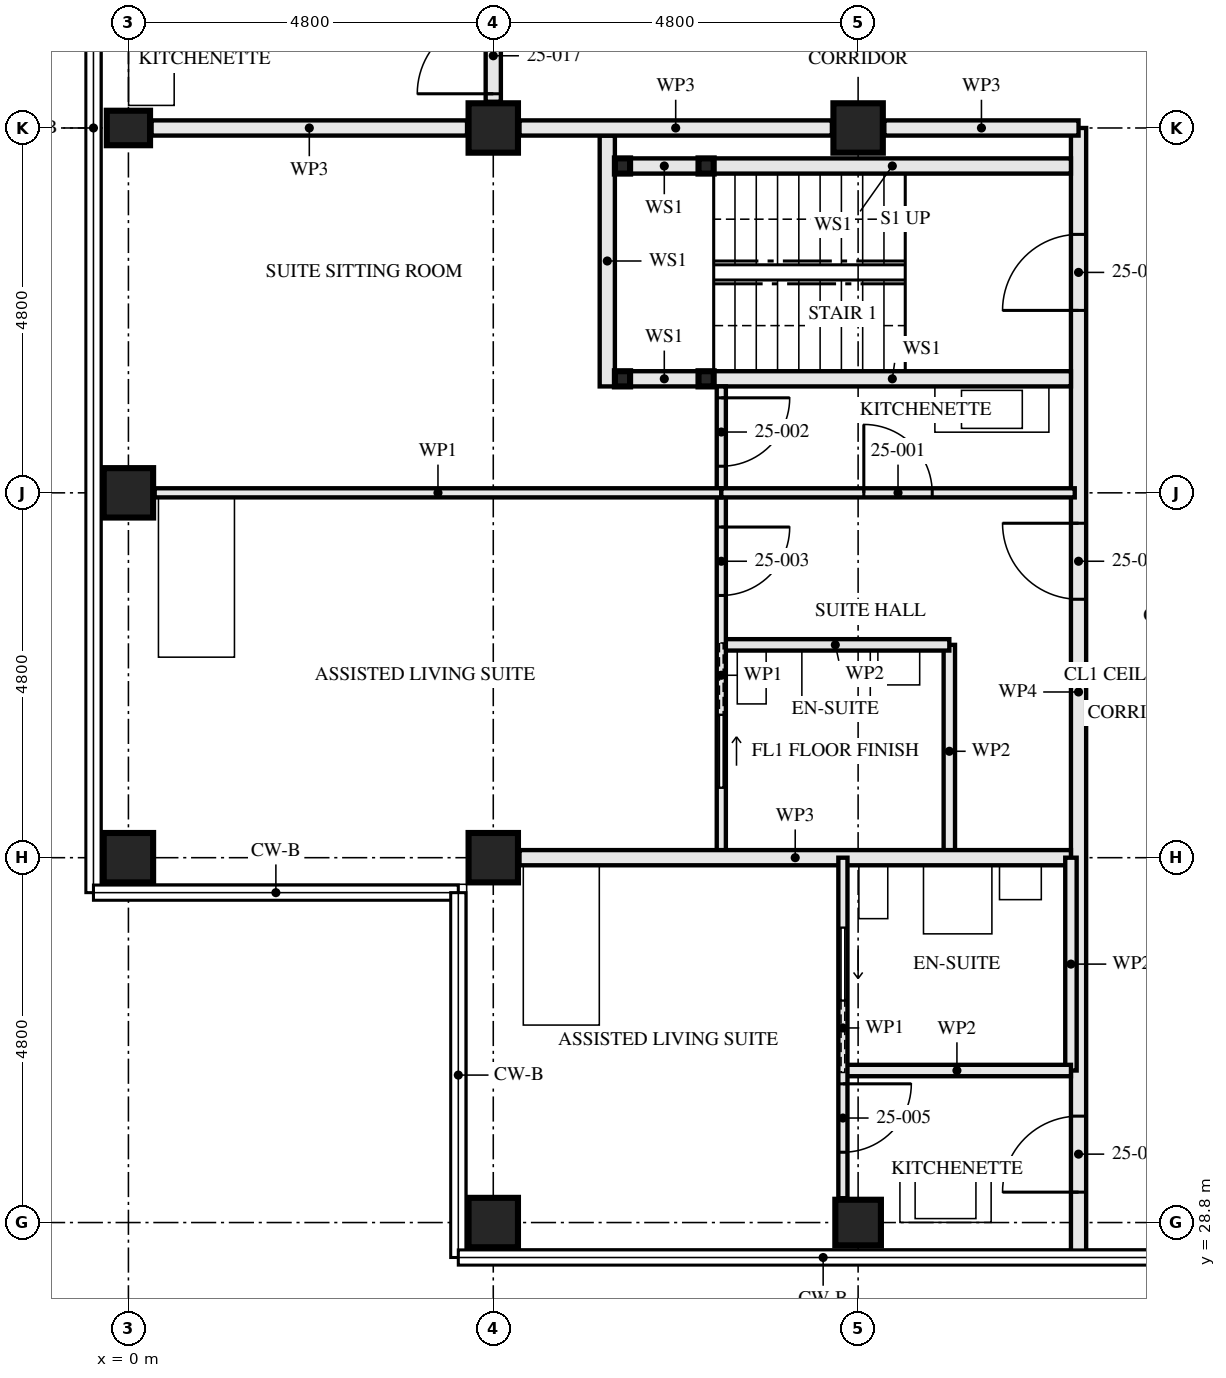
"""IFC4 building model, lengths in metres.
Left out: names, types, materials, properties, quantities, classifications, styles, units other than length and angle.
Written with IfcOpenShell. Run it as: python <this file> out.ifc"""

import sys

from ifc_helpers import new_model, si_unit, direction, frame, frame_2d, origin, origin_2d, place, context, subcontext, project, spatial, rectangle, hollow_rectangle, i_section, extrude, element, fill, save


model = new_model("IFC4")
c1 = context("Model", 3, precision=1e-05, world=origin(), true_north=direction((0.0, 1.0)))
c2 = subcontext(c1, "Body", "Model", "MODEL_VIEW")
j1 = project(units=[si_unit("LENGTHUNIT", "METRE"), si_unit("PLANEANGLEUNIT", "RADIAN")], contexts=[c1])
p1 = place(None, origin())
s1 = spatial("IfcSite", under=j1, at=p1, CompositionType="ELEMENT")
p2 = place(p1, origin())
s2 = spatial("IfcBuilding", under=s1, at=p2, CompositionType="ELEMENT")
p3 = place(p2, frame((0.0, 0.0, 94.5)))
s3 = spatial("IfcBuildingStorey", under=s2, at=p3, CompositionType="ELEMENT", Elevation=94.5)
for number, where, z_axis, x_axis in (
    (1, (0.0, 33.6, 0.0), (0.0, 0.0, 1.0), (0.0, 1.0, 0.0)),
    (2, (0.0, 38.4, 0.0), (0.0, 0.0, 1.0), (1.0, 0.0, 0.0)),
):
    element("IfcColumn", number, at=place(p3, frame(where, z_axis=z_axis, x_axis=x_axis)), inside=s3, PredefinedType="COLUMN", context=c2, shape_type="SweptSolid", body=[
        extrude(hollow_rectangle(XDim=0.65, YDim=0.65, WallThickness=0.08, at=origin_2d()), origin(), (0.0, 0.0, 1.0), 3.5),
    ])
p4 = place(p3, frame((0.0, 43.2, 0.0), z_axis=(0.0, 0.0, 1.0), x_axis=(0.0, 1.0, 0.0)))
e3 = element("IfcColumn", 3, at=p4, inside=s3, PredefinedType="COLUMN", context=c2, shape_type="SweptSolid", body=[
    extrude(i_section(OverallWidth=0.454, OverallDepth=0.569, WebThickness=0.078, FlangeThickness=0.125, FilletRadius=0.015, at=origin_2d()), origin(), (0.0, 0.0, 1.0), 3.5),
])
for number, where, z_axis, x_axis in (
    (4, (4.8, 28.8, 0.0), (0.0, 0.0, 1.0), (0.0, 1.0, 0.0)),
    (5, (4.8, 33.6, 0.0), (0.0, 0.0, 1.0), (0.0, 1.0, 0.0)),
):
    element("IfcColumn", number, at=place(p3, frame(where, z_axis=z_axis, x_axis=x_axis)), inside=s3, PredefinedType="COLUMN", context=c2, shape_type="SweptSolid", body=[
        extrude(hollow_rectangle(XDim=0.65, YDim=0.65, WallThickness=0.08, at=origin_2d()), origin(), (0.0, 0.0, 1.0), 3.5),
    ])
p5 = place(p3, frame((4.8, 43.2, 0.0), z_axis=(0.0, 0.0, 1.0), x_axis=(0.0, 1.0, 0.0)))
e6 = element("IfcColumn", 6, at=p5, inside=s3, PredefinedType="COLUMN", context=c2, shape_type="SweptSolid", body=[
    extrude(hollow_rectangle(XDim=0.65, YDim=0.65, WallThickness=0.05, at=origin_2d()), origin(), (0.0, 0.0, 1.0), 3.5),
])
p6 = place(p3, frame((9.6, 28.8, 0.0), z_axis=(0.0, 0.0, 1.0), x_axis=(0.0, 1.0, 0.0)))
e7 = element("IfcColumn", 7, at=p6, inside=s3, PredefinedType="COLUMN", context=c2, shape_type="SweptSolid", body=[
    extrude(hollow_rectangle(XDim=0.6, YDim=0.6, WallThickness=0.08, at=origin_2d()), origin(), (0.0, 0.0, 1.0), 3.5),
])
p7 = place(p3, frame((9.6, 43.2, 0.0), z_axis=(0.0, 0.0, 1.0), x_axis=(0.0, 1.0, 0.0)))
e8 = element("IfcColumn", 8, at=p7, inside=s3, PredefinedType="COLUMN", context=c2, shape_type="SweptSolid", body=[
    extrude(hollow_rectangle(XDim=0.65, YDim=0.65, WallThickness=0.05, at=origin_2d()), origin(), (0.0, 0.0, 1.0), 3.5),
])
for number, where, z_axis, x_axis in (
    (9, (6.5, 42.7, 0.0), (0.0, 0.0, 1.0), (1.0, 0.0, 0.0)),
    (10, (6.5, 39.9, 0.0), (0.0, 0.0, 1.0), (1.0, 0.0, 0.0)),
    (11, (7.6, 42.7, 0.0), (0.0, 0.0, 1.0), (1.0, 0.0, 0.0)),
    (12, (7.6, 39.9, 0.0), (0.0, 0.0, 1.0), (1.0, 0.0, 0.0)),
):
    element("IfcColumn", number, at=place(p3, frame(where, z_axis=z_axis, x_axis=x_axis)), inside=s3, PredefinedType="COLUMN", context=c2, shape_type="SweptSolid", body=[
        extrude(hollow_rectangle(XDim=0.2, YDim=0.2, WallThickness=0.008, at=origin_2d()), origin(), (0.0, 0.0, 1.0), 3.33),
    ])
p8 = place(p3, frame((6.6, 42.7, 0.0), z_axis=(0.0, 0.0, 1.0), x_axis=(1.0, 0.0, 0.0)))
e13 = element("IfcWall", 13, at=p8, inside=s3, PredefinedType="SOLIDWALL", context=c2, shape_type="SweptSolid", body=[
    extrude(rectangle(XDim=0.9, YDim=0.2, at=frame_2d((0.45, 0.0))), origin(), (0.0, 0.0, 1.0), 2.99),
])
p9 = place(p3, frame((7.7, 42.7, 0.0), z_axis=(0.0, 0.0, 1.0), x_axis=(1.0, 0.0, 0.0)))
e14 = element("IfcWall", 14, at=p9, inside=s3, PredefinedType="SOLIDWALL", context=c2, shape_type="SweptSolid", body=[
    extrude(rectangle(XDim=4.7, YDim=0.2, at=frame_2d((2.35, 0.0))), origin(), (0.0, 0.0, 1.0), 2.99),
])
p10 = place(p3, frame((6.6, 39.9, 0.0), z_axis=(0.0, 0.0, 1.0), x_axis=(1.0, 0.0, 0.0)))
e15 = element("IfcWall", 15, at=p10, inside=s3, PredefinedType="SOLIDWALL", context=c2, shape_type="SweptSolid", body=[
    extrude(rectangle(XDim=0.9, YDim=0.2, at=frame_2d((0.45, 0.0))), origin(), (0.0, 0.0, 1.0), 2.99),
])
p11 = place(p3, frame((7.7, 39.9, 0.0), z_axis=(0.0, 0.0, 1.0), x_axis=(1.0, 0.0, 0.0)))
e16 = element("IfcWall", 16, at=p11, inside=s3, PredefinedType="SOLIDWALL", context=c2, shape_type="SweptSolid", body=[
    extrude(rectangle(XDim=4.7, YDim=0.2, at=frame_2d((2.35, 0.0))), origin(), (0.0, 0.0, 1.0), 2.99),
])
p12 = place(p3, frame((6.3, 43.1, 0.0), z_axis=(0.0, 0.0, 1.0), x_axis=(0.0, -1.0, 0.0)))
e17 = element("IfcWall", 17, at=p12, inside=s3, PredefinedType="SOLIDWALL", context=c2, shape_type="SweptSolid", body=[
    extrude(rectangle(XDim=3.3, YDim=0.2, at=frame_2d((1.65, 0.0))), origin(), (0.0, 0.0, 1.0), 3.33),
])
p13 = place(p3, frame((7.8, 36.4, 0.0), z_axis=(0.0, 0.0, 1.0), x_axis=(1.0, 0.0, 0.0)))
e18 = element("IfcWall", 18, at=p13, inside=s3, PredefinedType="PARTITIONING", context=c2, shape_type="SweptSolid", body=[
    extrude(rectangle(XDim=3.0, YDim=0.15, at=frame_2d((1.5, 0.0))), origin(), (0.0, 0.0, 1.0), 3.33),
])
p14 = place(p3, frame((10.8, 36.4, 0.0), z_axis=(0.0, 0.0, 1.0), x_axis=(0.0, -1.0, 0.0)))
e19 = element("IfcWall", 19, at=p14, inside=s3, PredefinedType="PARTITIONING", context=c2, shape_type="SweptSolid", body=[
    extrude(rectangle(XDim=2.8, YDim=0.15, at=frame_2d((1.4, 0.0))), origin(), (0.0, 0.0, 1.0), 3.33),
])
p15 = place(p3, frame((7.8, 38.4, 0.0), z_axis=(0.0, 0.0, 1.0), x_axis=(1.0, 0.0, 0.0)))
e20 = element("IfcWall", 20, at=p15, inside=s3, PredefinedType="PARTITIONING", context=c2, shape_type="SweptSolid", body=[
    extrude(rectangle(XDim=4.65, YDim=0.12, at=frame_2d((2.325, 0.0))), origin(), (0.0, 0.0, 1.0), 2.55),
])
p16 = place(p15, frame((1.875, 0.0, 0.0)))
e21 = element("IfcOpeningElement", 21, at=p16, cuts=e20, PredefinedType="OPENING", context=c2, shape_type="SweptSolid", body=[
    extrude(rectangle(XDim=0.9, YDim=2.1, at=frame_2d((0.45, 1.05))), frame((0.0, 0.071, 0.0), z_axis=(0.0, -1.0, 0.0), x_axis=(1.0, 0.0, 0.0)), (0.0, 0.0, 1.0), 0.141),
])
p17 = place(p3, frame((7.8, 39.8, 0.0), z_axis=(0.0, 0.0, 1.0), x_axis=(0.0, -1.0, 0.0)))
e22 = element("IfcWall", 22, at=p17, inside=s3, PredefinedType="PARTITIONING", context=c2, shape_type="SweptSolid", body=[
    extrude(rectangle(XDim=1.4, YDim=0.12, at=frame_2d((0.7, 0.0))), origin(), (0.0, 0.0, 1.0), 3.33),
])
p18 = place(p17, frame((0.15, 0.0, 0.0)))
e23 = element("IfcOpeningElement", 23, at=p18, cuts=e22, PredefinedType="OPENING", context=c2, shape_type="SweptSolid", body=[
    extrude(rectangle(XDim=0.9, YDim=2.1, at=frame_2d((0.45, 1.05))), frame((0.0, 0.071, 0.0), z_axis=(0.0, -1.0, 0.0), x_axis=(1.0, 0.0, 0.0)), (0.0, 0.0, 1.0), 0.141),
])
p19 = place(p3, frame((7.8, 38.4, 0.0), z_axis=(0.0, 0.0, 1.0), x_axis=(0.0, -1.0, 0.0)))
e24 = element("IfcWall", 24, at=p19, inside=s3, PredefinedType="PARTITIONING", context=c2, shape_type="SweptSolid", body=[
    extrude(rectangle(XDim=4.8, YDim=0.12, at=frame_2d((2.4, 0.0))), origin(), (0.0, 0.0, 1.0), 3.33),
])
p20 = place(p19, frame((0.45, 0.0, 0.0)))
e25 = element("IfcOpeningElement", 25, at=p20, cuts=e24, PredefinedType="OPENING", context=c2, shape_type="SweptSolid", body=[
    extrude(rectangle(XDim=0.9, YDim=2.1, at=frame_2d((0.45, 1.05))), frame((0.0, 0.071, 0.0), z_axis=(0.0, -1.0, 0.0), x_axis=(1.0, 0.0, 0.0)), (0.0, 0.0, 1.0), 0.141),
])
p21 = place(p19, frame((2.925, 0.0, 0.0)))
e26 = element("IfcOpeningElement", 26, at=p21, cuts=e24, PredefinedType="OPENING", context=c2, shape_type="SweptSolid", body=[
    extrude(rectangle(XDim=0.95, YDim=2.1, at=frame_2d((0.475, 1.05))), frame((0.0, 0.071, 0.0), z_axis=(0.0, -1.0, 0.0), x_axis=(1.0, 0.0, 0.0)), (0.0, 0.0, 1.0), 0.141),
])
p22 = place(p3, frame((0.345, 38.4, 0.0), z_axis=(0.0, 0.0, 1.0), x_axis=(1.0, 0.0, 0.0)))
e27 = element("IfcWall", 27, at=p22, inside=s3, PredefinedType="PARTITIONING", context=c2, shape_type="SweptSolid", body=[
    extrude(rectangle(XDim=7.455, YDim=0.12, at=frame_2d((3.728, 0.0))), origin(), (0.0, 0.0, 1.0), 2.55),
])
p23 = place(p3, frame((5.145, 33.6, 0.0), z_axis=(0.0, 0.0, 1.0), x_axis=(1.0, 0.0, 0.0)))
e28 = element("IfcWall", 28, at=p23, inside=s3, PredefinedType="PARTITIONING", context=c2, shape_type="SweptSolid", body=[
    extrude(rectangle(XDim=7.255, YDim=0.2, at=frame_2d((3.627, 0.0))), origin(), (0.0, 0.0, 1.0), 2.55),
])
p24 = place(p3, frame((9.4, 30.8, 0.0), z_axis=(0.0, 0.0, 1.0), x_axis=(1.0, 0.0, 0.0)))
e29 = element("IfcWall", 29, at=p24, inside=s3, PredefinedType="PARTITIONING", context=c2, shape_type="SweptSolid", body=[
    extrude(rectangle(XDim=3.0, YDim=0.15, at=frame_2d((1.5, 0.0))), origin(), (0.0, 0.0, 1.0), 3.33),
])
p25 = place(p3, frame((12.4, 33.6, 0.0), z_axis=(0.0, 0.0, 1.0), x_axis=(0.0, -1.0, 0.0)))
e30 = element("IfcWall", 30, at=p25, inside=s3, PredefinedType="PARTITIONING", context=c2, shape_type="SweptSolid", body=[
    extrude(rectangle(XDim=2.8, YDim=0.15, at=frame_2d((1.4, 0.0))), origin(), (0.0, 0.0, 1.0), 3.33),
])
p26 = place(p3, frame((9.4, 33.6, 0.0), z_axis=(0.0, 0.0, 1.0), x_axis=(0.0, -1.0, 0.0)))
e31 = element("IfcWall", 31, at=p26, inside=s3, PredefinedType="PARTITIONING", context=c2, shape_type="SweptSolid", body=[
    extrude(rectangle(XDim=4.48, YDim=0.12, at=frame_2d((2.24, 0.0))), origin(), (0.0, 0.0, 1.0), 3.33),
])
p27 = place(p26, frame((2.975, 0.0, 0.0)))
e32 = element("IfcOpeningElement", 32, at=p27, cuts=e31, PredefinedType="OPENING", context=c2, shape_type="SweptSolid", body=[
    extrude(rectangle(XDim=0.9, YDim=2.1, at=frame_2d((0.45, 1.05))), frame((0.0, 0.071, 0.0), z_axis=(0.0, -1.0, 0.0), x_axis=(1.0, 0.0, 0.0)), (0.0, 0.0, 1.0), 0.141),
])
p28 = place(p26, frame((0.925, 0.0, 0.0)))
e33 = element("IfcOpeningElement", 33, at=p28, cuts=e31, PredefinedType="OPENING", context=c2, shape_type="SweptSolid", body=[
    extrude(rectangle(XDim=0.95, YDim=2.1, at=frame_2d((0.475, 1.05))), frame((0.0, 0.071, 0.0), z_axis=(0.0, -1.0, 0.0), x_axis=(1.0, 0.0, 0.0)), (0.0, 0.0, 1.0), 0.141),
])
p29 = place(p3, frame((12.5, 43.2, 0.0), z_axis=(0.0, 0.0, 1.0), x_axis=(0.0, -1.0, 0.0)))
e34 = element("IfcWall", 34, at=p29, inside=s3, PredefinedType="PARTITIONING", context=c2, shape_type="SweptSolid", body=[
    extrude(rectangle(XDim=14.84, YDim=0.2, at=frame_2d((7.42, 0.0))), origin(), (0.0, 0.0, 1.0), 2.32),
])
p30 = place(p29, frame((1.4, 0.0, 0.0)))
e35 = element("IfcOpeningElement", 35, at=p30, cuts=e34, PredefinedType="OPENING", context=c2, shape_type="SweptSolid", body=[
    extrude(rectangle(XDim=1.0, YDim=2.1, at=frame_2d((0.5, 1.05))), frame((0.0, 0.111, 0.0), z_axis=(0.0, -1.0, 0.0), x_axis=(1.0, 0.0, 0.0)), (0.0, 0.0, 1.0), 0.221),
])
p31 = place(p29, frame((5.2, 0.0, 0.0)))
e36 = element("IfcOpeningElement", 36, at=p31, cuts=e34, PredefinedType="OPENING", context=c2, shape_type="SweptSolid", body=[
    extrude(rectangle(XDim=1.0, YDim=2.1, at=frame_2d((0.5, 1.05))), frame((0.0, 0.111, 0.0), z_axis=(0.0, -1.0, 0.0), x_axis=(1.0, 0.0, 0.0)), (0.0, 0.0, 1.0), 0.221),
])
p32 = place(p29, frame((13.0, 0.0, 0.0)))
e37 = element("IfcOpeningElement", 37, at=p32, cuts=e34, PredefinedType="OPENING", context=c2, shape_type="SweptSolid", body=[
    extrude(rectangle(XDim=1.0, YDim=2.1, at=frame_2d((0.5, 1.05))), frame((0.0, 0.111, 0.0), z_axis=(0.0, -1.0, 0.0), x_axis=(1.0, 0.0, 0.0)), (0.0, 0.0, 1.0), 0.221),
])
p33 = place(p3, frame((4.8, 45.2, 0.0), z_axis=(0.0, 0.0, 1.0), x_axis=(0.0, -1.0, 0.0)))
e38 = element("IfcWall", 38, at=p33, inside=s3, PredefinedType="PARTITIONING", context=c2, shape_type="SweptSolid", body=[
    extrude(rectangle(XDim=1.655, YDim=0.2, at=frame_2d((0.828, 0.0))), origin(), (0.0, 0.0, 1.0), 3.33),
])
p34 = place(p33, frame((0.55, 0.0, 0.0)))
e39 = element("IfcOpeningElement", 39, at=p34, cuts=e38, PredefinedType="OPENING", context=c2, shape_type="SweptSolid", body=[
    extrude(rectangle(XDim=1.0, YDim=2.1, at=frame_2d((0.5, 1.05))), frame((0.0, 0.111, 0.0), z_axis=(0.0, -1.0, 0.0), x_axis=(1.0, 0.0, 0.0)), (0.0, 0.0, 1.0), 0.221),
])
p35 = place(p3, frame((12.5, 43.2, 0.0), z_axis=(0.0, 0.0, 1.0), x_axis=(-1.0, 0.0, 0.0)))
e40 = element("IfcWall", 40, at=p35, inside=s3, PredefinedType="PARTITIONING", context=c2, shape_type="SweptSolid", body=[
    extrude(rectangle(XDim=2.555, YDim=0.2, at=frame_2d((1.277, 0.0))), origin(), (0.0, 0.0, 1.0), 2.32),
])
p36 = place(p3, frame((9.255, 43.2, 0.0), z_axis=(0.0, 0.0, 1.0), x_axis=(-1.0, 0.0, 0.0)))
e41 = element("IfcWall", 41, at=p36, inside=s3, PredefinedType="PARTITIONING", context=c2, shape_type="SweptSolid", body=[
    extrude(rectangle(XDim=4.11, YDim=0.2, at=frame_2d((2.055, 0.0))), origin(), (0.0, 0.0, 1.0), 2.32),
])
p37 = place(p3, frame((4.455, 43.2, 0.0), z_axis=(0.0, 0.0, 1.0), x_axis=(-1.0, 0.0, 0.0)))
e42 = element("IfcWall", 42, at=p37, inside=s3, PredefinedType="PARTITIONING", context=c2, shape_type="SweptSolid", body=[
    extrude(rectangle(XDim=4.151, YDim=0.2, at=frame_2d((2.075, 0.0))), origin(), (0.0, 0.0, 1.0), 2.32),
])
p38 = place(p16, origin())
e43 = element("IfcDoor", 43, at=p38, inside=s3, OperationType="SINGLE_SWING_RIGHT", PredefinedType="DOOR", context=c2, shape_type="SweptSolid", body=[
    extrude(rectangle(XDim=0.9, YDim=2.1, at=frame_2d((0.45, 1.05))), frame((0.0, 0.022, 0.0), z_axis=(0.0, -1.0, 0.0), x_axis=(1.0, 0.0, 0.0)), (0.0, 0.0, 1.0), 0.044),
])
fill(e21, e43)
p39 = place(p18, origin())
e44 = element("IfcDoor", 44, at=p39, inside=s3, OperationType="SINGLE_SWING_RIGHT", PredefinedType="DOOR", context=c2, shape_type="SweptSolid", body=[
    extrude(rectangle(XDim=0.9, YDim=2.1, at=frame_2d((0.45, 1.05))), frame((0.0, 0.022, 0.0), z_axis=(0.0, -1.0, 0.0), x_axis=(1.0, 0.0, 0.0)), (0.0, 0.0, 1.0), 0.044),
])
fill(e23, e44)
p40 = place(p20, origin())
e45 = element("IfcDoor", 45, at=p40, inside=s3, OperationType="SINGLE_SWING_RIGHT", PredefinedType="DOOR", context=c2, shape_type="SweptSolid", body=[
    extrude(rectangle(XDim=0.9, YDim=2.1, at=frame_2d((0.45, 1.05))), frame((0.0, 0.022, 0.0), z_axis=(0.0, -1.0, 0.0), x_axis=(1.0, 0.0, 0.0)), (0.0, 0.0, 1.0), 0.044),
])
fill(e25, e45)
p41 = place(p21, origin())
e46 = element("IfcDoor", 46, at=p41, inside=s3, OperationType="SLIDING_TO_RIGHT", PredefinedType="DOOR", context=c2, shape_type="SweptSolid", body=[
    extrude(rectangle(XDim=0.95, YDim=2.1, at=frame_2d((0.475, 1.05))), frame((0.0, 0.022, 0.0), z_axis=(0.0, -1.0, 0.0), x_axis=(1.0, 0.0, 0.0)), (0.0, 0.0, 1.0), 0.044),
])
fill(e26, e46)
p42 = place(p27, origin())
e47 = element("IfcDoor", 47, at=p42, inside=s3, OperationType="SINGLE_SWING_RIGHT", PredefinedType="DOOR", context=c2, shape_type="SweptSolid", body=[
    extrude(rectangle(XDim=0.9, YDim=2.1, at=frame_2d((0.45, 1.05))), frame((0.0, 0.022, 0.0), z_axis=(0.0, -1.0, 0.0), x_axis=(1.0, 0.0, 0.0)), (0.0, 0.0, 1.0), 0.044),
])
fill(e32, e47)
p43 = place(p28, origin())
e48 = element("IfcDoor", 48, at=p43, inside=s3, OperationType="SLIDING_TO_LEFT", PredefinedType="DOOR", context=c2, shape_type="SweptSolid", body=[
    extrude(rectangle(XDim=0.95, YDim=2.1, at=frame_2d((0.475, 1.05))), frame((0.0, 0.022, 0.0), z_axis=(0.0, -1.0, 0.0), x_axis=(1.0, 0.0, 0.0)), (0.0, 0.0, 1.0), 0.044),
])
fill(e33, e48)
p44 = place(p30, frame((1.0, 0.0, 0.0), z_axis=(0.0, 0.0, 1.0), x_axis=(-1.0, 0.0, 0.0)))
e49 = element("IfcDoor", 49, at=p44, inside=s3, OperationType="SINGLE_SWING_RIGHT", PredefinedType="DOOR", context=c2, shape_type="SweptSolid", body=[
    extrude(rectangle(XDim=1.0, YDim=2.1, at=frame_2d((0.5, 1.05))), frame((0.0, 0.032, 0.0), z_axis=(0.0, -1.0, 0.0), x_axis=(1.0, 0.0, 0.0)), (0.0, 0.0, 1.0), 0.064),
])
fill(e35, e49)
p45 = place(p31, frame((1.0, 0.0, 0.0), z_axis=(0.0, 0.0, 1.0), x_axis=(-1.0, 0.0, 0.0)))
e50 = element("IfcDoor", 50, at=p45, inside=s3, OperationType="SINGLE_SWING_LEFT", PredefinedType="DOOR", context=c2, shape_type="SweptSolid", body=[
    extrude(rectangle(XDim=1.0, YDim=2.1, at=frame_2d((0.5, 1.05))), frame((0.0, 0.027, 0.0), z_axis=(0.0, -1.0, 0.0), x_axis=(1.0, 0.0, 0.0)), (0.0, 0.0, 1.0), 0.054),
])
fill(e36, e50)
p46 = place(p32, frame((1.0, 0.0, 0.0), z_axis=(0.0, 0.0, 1.0), x_axis=(-1.0, 0.0, 0.0)))
e51 = element("IfcDoor", 51, at=p46, inside=s3, OperationType="SINGLE_SWING_RIGHT", PredefinedType="DOOR", context=c2, shape_type="SweptSolid", body=[
    extrude(rectangle(XDim=1.0, YDim=2.1, at=frame_2d((0.5, 1.05))), frame((0.0, 0.027, 0.0), z_axis=(0.0, -1.0, 0.0), x_axis=(1.0, 0.0, 0.0)), (0.0, 0.0, 1.0), 0.054),
])
fill(e37, e51)
p47 = place(p34, frame((1.0, 0.0, 0.0), z_axis=(0.0, 0.0, 1.0), x_axis=(-1.0, 0.0, 0.0)))
e52 = element("IfcDoor", 52, at=p47, inside=s3, OperationType="SINGLE_SWING_RIGHT", PredefinedType="DOOR", context=c2, shape_type="SweptSolid", body=[
    extrude(rectangle(XDim=1.0, YDim=2.1, at=frame_2d((0.5, 1.05))), frame((0.0, 0.027, 0.0), z_axis=(0.0, -1.0, 0.0), x_axis=(1.0, 0.0, 0.0)), (0.0, 0.0, 1.0), 0.054),
])
fill(e39, e52)
save(model, sys.argv[1])
